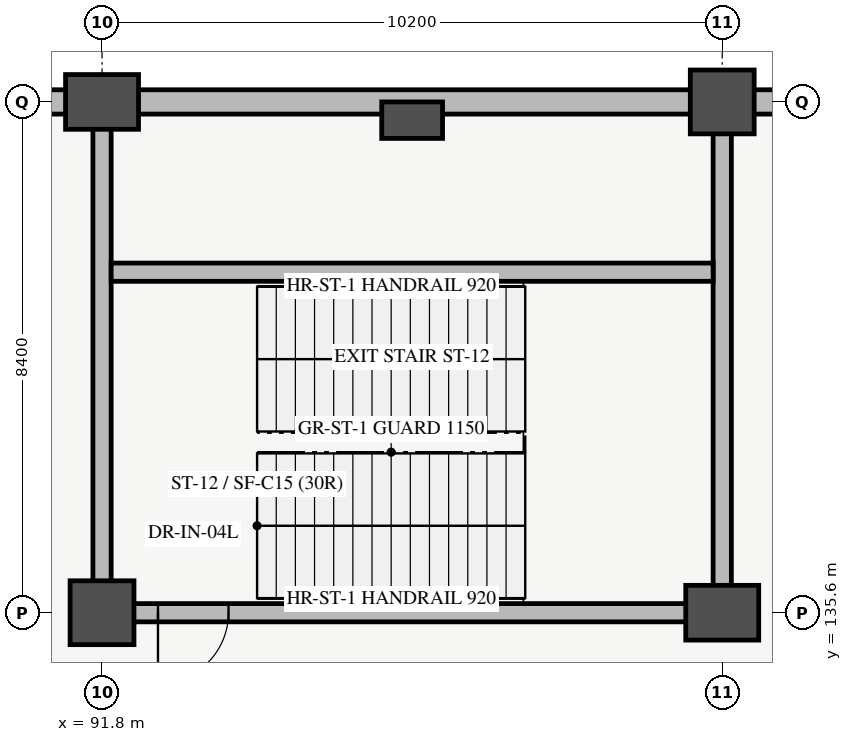
"""IFC4 building model, lengths in metres.
Left out: names, types, materials, properties, quantities, classifications, styles, units other than length and angle.
Written with IfcOpenShell. Run it as: python <this file> out.ifc"""

import sys

from ifc_helpers import new_model, si_unit, direction, frame, frame_2d, origin, origin_2d, place, context, subcontext, project, spatial, rectangle, extrude, element, fill, save


model = new_model("IFC4")
c1 = context("Model", 3, precision=1e-05, world=origin(), true_north=direction((0.0, 1.0)))
c2 = subcontext(c1, "Body", "Model", "MODEL_VIEW")
j1 = project(units=[si_unit("LENGTHUNIT", "METRE"), si_unit("PLANEANGLEUNIT", "RADIAN")], contexts=[c1])
p1 = place(None, origin())
s1 = spatial("IfcSite", under=j1, at=p1, CompositionType="ELEMENT")
p2 = place(p1, origin())
s2 = spatial("IfcBuilding", under=s1, at=p2, CompositionType="ELEMENT")
p3 = place(p2, frame((0.0, 0.0, -4.5)))
s3 = spatial("IfcBuildingStorey", under=s2, at=p3, CompositionType="ELEMENT", Elevation=-4.5)
p4 = place(p3, frame((91.8, 135.6, 0.0), z_axis=(0.0, 0.0, 1.0), x_axis=(1.0, 0.0, 0.0)))
e1 = element("IfcColumn", 1, at=p4, inside=s3, PredefinedType="COLUMN", context=c2, shape_type="SweptSolid", body=[
    extrude(rectangle(XDim=1.05, YDim=1.05, at=origin_2d()), origin(), (0.0, 0.0, 1.0), 4.5),
])
for number, where, z_axis, x_axis in (
    (2, (91.8, 144.0, 0.0), (0.0, 0.0, 1.0), (1.0, 0.0, 0.0)),
    (3, (102.0, 135.6, 0.0), (0.0, 0.0, 1.0), (1.0, 0.0, 0.0)),
):
    element("IfcColumn", number, at=place(p3, frame(where, z_axis=z_axis, x_axis=x_axis)), inside=s3, PredefinedType="COLUMN", context=c2, shape_type="SweptSolid", body=[
        extrude(rectangle(XDim=1.2, YDim=0.9, at=origin_2d()), origin(), (0.0, 0.0, 1.0), 4.5),
    ])
p5 = place(p3, frame((102.0, 144.0, 0.0), z_axis=(0.0, 0.0, 1.0), x_axis=(1.0, 0.0, 0.0)))
e4 = element("IfcColumn", 4, at=p5, inside=s3, PredefinedType="COLUMN", context=c2, shape_type="SweptSolid", body=[
    extrude(rectangle(XDim=1.05, YDim=1.05, at=origin_2d()), origin(), (0.0, 0.0, 1.0), 4.5),
])
p6 = place(p3, frame((96.9, 143.7, 0.0), z_axis=(0.0, 0.0, 1.0), x_axis=(1.0, 0.0, 0.0)))
e5 = element("IfcColumn", 5, at=p6, inside=s3, PredefinedType="PILASTER", context=c2, shape_type="SweptSolid", body=[
    extrude(rectangle(XDim=1.0, YDim=0.6, at=origin_2d()), origin(), (0.0, 0.0, 1.0), 4.5),
])
p7 = place(p3, frame((0.0, 144.0, 0.0), z_axis=(0.0, 0.0, 1.0), x_axis=(1.0, 0.0, 0.0)))
e6 = element("IfcWall", 6, at=p7, inside=s3, PredefinedType="SOLIDWALL", context=c2, shape_type="SweptSolid", body=[
    extrude(rectangle(XDim=224.4, YDim=0.4, at=frame_2d((112.2, 0.0))), origin(), (0.0, 0.0, 1.0), 4.1),
])
p8 = place(p3, frame((91.8, 135.6, 0.0), z_axis=(0.0, 0.0, 1.0), x_axis=(1.0, 0.0, 0.0)))
e7 = element("IfcWall", 7, at=p8, inside=s3, PredefinedType="SHEAR", context=c2, shape_type="SweptSolid", body=[
    extrude(rectangle(XDim=10.2, YDim=0.3, at=frame_2d((5.1, 0.0))), origin(), (0.0, 0.0, 1.0), 4.5),
])
p9 = place(p8, frame((0.92, 0.0, 0.0)))
e8 = element("IfcOpeningElement", 8, at=p9, cuts=e7, PredefinedType="OPENING", context=c2, shape_type="SweptSolid", body=[
    extrude(rectangle(XDim=1.16, YDim=2.2, at=frame_2d((0.58, 1.1))), frame((0.0, 0.16, 0.0), z_axis=(0.0, -1.0, 0.0), x_axis=(1.0, 0.0, 0.0)), (0.0, 0.0, 1.0), 0.32),
])
for number, where, z_axis, x_axis in (
    (9, (91.8, 135.6, 0.0), (0.0, 0.0, 1.0), (0.0, 1.0, 0.0)),
    (10, (102.0, 135.6, 0.0), (0.0, 0.0, 1.0), (0.0, 1.0, 0.0)),
):
    element("IfcWall", number, at=place(p3, frame(where, z_axis=z_axis, x_axis=x_axis)), inside=s3, PredefinedType="SHEAR", context=c2, shape_type="SweptSolid", body=[
        extrude(rectangle(XDim=8.4, YDim=0.3, at=frame_2d((4.2, 0.0))), origin(), (0.0, 0.0, 1.0), 4.5),
    ])
p10 = place(p3, frame((91.95, 141.2, 0.0), z_axis=(0.0, 0.0, 1.0), x_axis=(1.0, 0.0, 0.0)))
e11 = element("IfcWall", 11, at=p10, inside=s3, PredefinedType="SHEAR", context=c2, shape_type="SweptSolid", body=[
    extrude(rectangle(XDim=9.9, YDim=0.3, at=frame_2d((4.95, 0.0))), origin(), (0.0, 0.0, 1.0), 4.5),
])
p11 = place(p9, origin())
e12 = element("IfcDoor", 12, at=p11, inside=s3, OperationType="SINGLE_SWING_LEFT", PredefinedType="DOOR", context=c2, shape_type="SweptSolid", body=[
    extrude(rectangle(XDim=1.16, YDim=2.2, at=frame_2d((0.58, 1.1))), frame((0.0, 0.025, 0.0), z_axis=(0.0, -1.0, 0.0), x_axis=(1.0, 0.0, 0.0)), (0.0, 0.0, 1.0), 0.05),
])
fill(e8, e12)
save(model, sys.argv[1])
